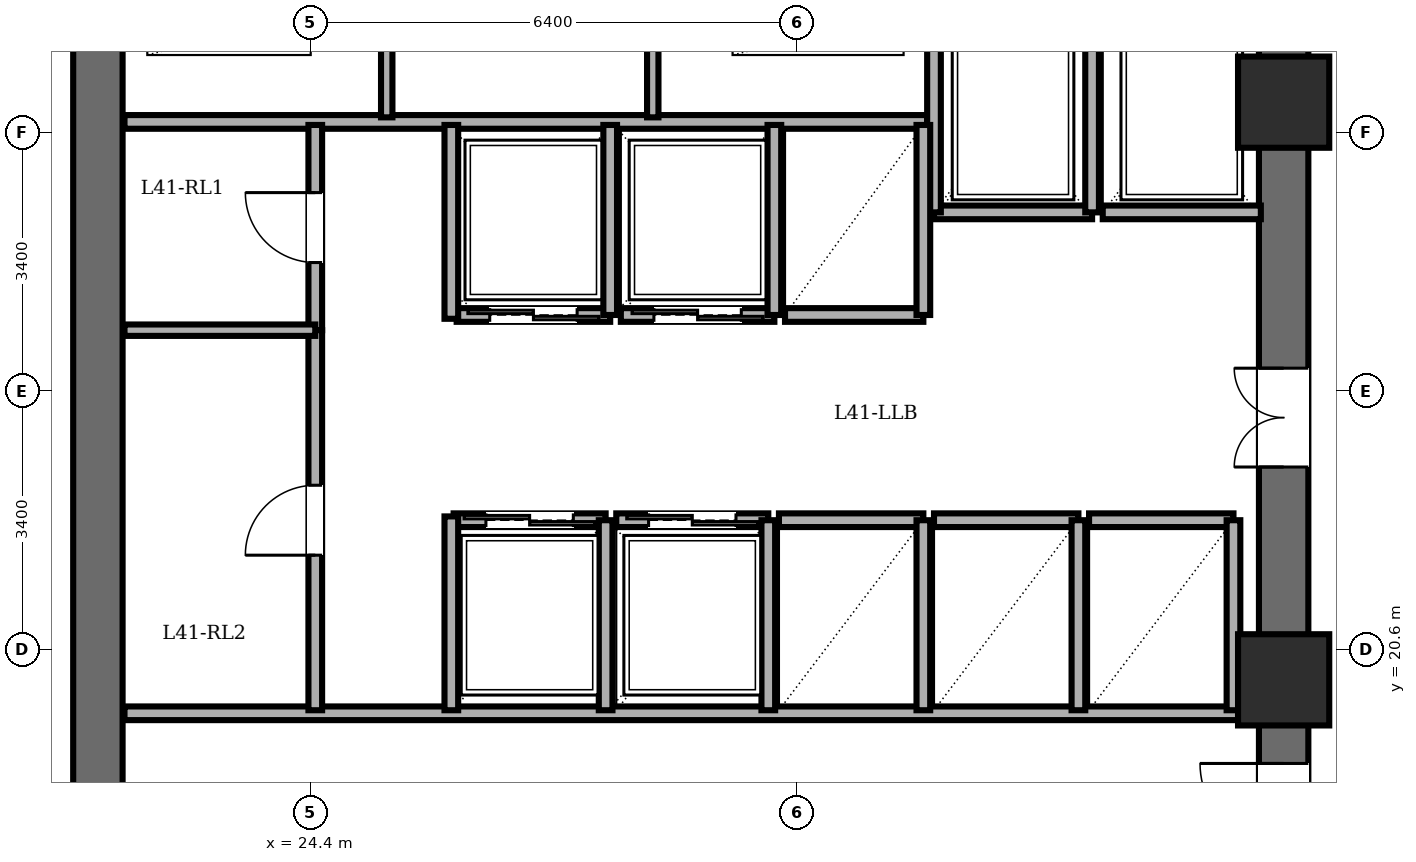
"""IFC4 building model, lengths in metres.
Left out: names, types, materials, properties, quantities, classifications, styles, units other than length and angle.
Written with IfcOpenShell. Run it as: python <this file> out.ifc"""

import sys

from ifc_helpers import new_model, si_unit, direction, frame, frame_2d, origin, origin_2d, place, context, subcontext, project, spatial, rectangle, extrude, element, fill, save


model = new_model("IFC4")
c1 = context("Model", 3, precision=1e-05, world=origin(), true_north=direction((0.0, 1.0)))
c2 = subcontext(c1, "Body", "Model", "MODEL_VIEW")
j1 = project(units=[si_unit("LENGTHUNIT", "METRE"), si_unit("PLANEANGLEUNIT", "RADIAN")], contexts=[c1])
p1 = place(None, origin())
s1 = spatial("IfcSite", under=j1, at=p1, CompositionType="ELEMENT")
p2 = place(p1, origin())
s2 = spatial("IfcBuilding", under=s1, at=p2, CompositionType="ELEMENT")
p3 = place(p2, frame((0.0, 0.0, 158.2)))
s3 = spatial("IfcBuildingStorey", under=s2, at=p3, CompositionType="ELEMENT", Elevation=158.2)
for number, where, z_axis, x_axis in (
    (1, (37.2, 20.2, 0.0), (0.0, 0.0, 1.0), (1.0, 0.0, 0.0)),
    (2, (37.2, 27.8, 0.0), (0.0, 0.0, 1.0), (1.0, 0.0, 0.0)),
):
    element("IfcColumn", number, at=place(p3, frame(where, z_axis=z_axis, x_axis=x_axis)), inside=s3, PredefinedType="COLUMN", context=c2, shape_type="SweptSolid", body=[
        extrude(rectangle(XDim=1.2, YDim=1.2, at=origin_2d()), origin(), (0.0, 0.0, 1.0), 3.6),
    ])
p4 = place(p3, frame((21.6, 14.4, 0.0), z_axis=(0.0, 0.0, 1.0), x_axis=(0.0, 1.0, 0.0)))
e3 = element("IfcWall", 3, at=p4, inside=s3, PredefinedType="SHEAR", context=c2, shape_type="SweptSolid", body=[
    extrude(rectangle(XDim=19.2, YDim=0.65, at=frame_2d((9.6, 0.0))), origin(), (0.0, 0.0, 1.0), 3.4),
])
p5 = place(p3, frame((37.2, 14.4, 0.0), z_axis=(0.0, 0.0, 1.0), x_axis=(0.0, 1.0, 0.0)))
e4 = element("IfcWall", 4, at=p5, inside=s3, PredefinedType="SHEAR", context=c2, shape_type="SweptSolid", body=[
    extrude(rectangle(XDim=19.2, YDim=0.65, at=frame_2d((9.6, 0.0))), origin(), (0.0, 0.0, 1.0), 3.4),
])
p6 = place(p5, frame((15.8, 0.0, 0.0)))
e5 = element("IfcOpeningElement", 5, at=p6, cuts=e4, PredefinedType="OPENING", context=c2, shape_type="SweptSolid", body=[
    extrude(rectangle(XDim=1.15, YDim=2.15, at=frame_2d((0.575, 1.075))), frame((0.0, 0.335, 0.0), z_axis=(0.0, -1.0, 0.0), x_axis=(1.0, 0.0, 0.0)), (0.0, 0.0, 1.0), 0.67),
])
p7 = place(p5, frame((3.6, 0.0, 0.0)))
e6 = element("IfcOpeningElement", 6, at=p7, cuts=e4, PredefinedType="OPENING", context=c2, shape_type="SweptSolid", body=[
    extrude(rectangle(XDim=1.1, YDim=2.15, at=frame_2d((0.55, 1.075))), frame((0.0, 0.335, 0.0), z_axis=(0.0, -1.0, 0.0), x_axis=(1.0, 0.0, 0.0)), (0.0, 0.0, 1.0), 0.67),
])
p8 = place(p5, frame((8.6, 0.0, 0.0)))
e7 = element("IfcOpeningElement", 7, at=p8, cuts=e4, PredefinedType="OPENING", context=c2, shape_type="SweptSolid", body=[
    extrude(rectangle(XDim=1.3, YDim=2.2, at=frame_2d((0.65, 1.1))), frame((0.0, 0.335, 0.0), z_axis=(0.0, -1.0, 0.0), x_axis=(1.0, 0.0, 0.0)), (0.0, 0.0, 1.0), 0.67),
])
p9 = place(p3, frame((21.95, 27.54, 0.0), z_axis=(0.0, 0.0, 1.0), x_axis=(1.0, 0.0, 0.0)))
e8 = element("IfcWall", 8, at=p9, inside=s3, PredefinedType="PARTITIONING", context=c2, shape_type="SweptSolid", body=[
    extrude(rectangle(XDim=10.56, YDim=0.18, at=frame_2d((5.28, 0.0))), origin(), (0.0, 0.0, 1.0), 3.4),
])
for number, where, z_axis, x_axis in (
    (9, (25.4, 27.6, 0.0), (0.0, 0.0, 1.0), (0.0, 1.0, 0.0)),
    (10, (28.9, 27.6, 0.0), (0.0, 0.0, 1.0), (0.0, 1.0, 0.0)),
):
    element("IfcWall", number, at=place(p3, frame(where, z_axis=z_axis, x_axis=x_axis)), inside=s3, PredefinedType="PARTITIONING", context=c2, shape_type="SweptSolid", body=[
        extrude(rectangle(XDim=1.52, YDim=0.15, at=frame_2d((0.76, 0.0))), origin(), (0.0, 0.0, 1.0), 3.4),
    ])
p10 = place(p3, frame((21.95, 19.76, 0.0), z_axis=(0.0, 0.0, 1.0), x_axis=(1.0, 0.0, 0.0)))
e11 = element("IfcWall", 11, at=p10, inside=s3, PredefinedType="PARTITIONING", context=c2, shape_type="SweptSolid", body=[
    extrude(rectangle(XDim=14.87, YDim=0.18, at=frame_2d((7.435, 0.0))), origin(), (0.0, 0.0, 1.0), 3.4),
])
p11 = place(p3, frame((34.68, 26.35, 0.0), z_axis=(0.0, 0.0, 1.0), x_axis=(-1.0, 0.0, 0.0)))
e12 = element("IfcWall", 12, at=p11, inside=s3, PredefinedType="PARTITIONING", context=c2, shape_type="SweptSolid", body=[
    extrude(rectangle(XDim=2.08, YDim=0.18, at=frame_2d((1.04, 0.0))), origin(), (0.0, 0.0, 1.0), 3.4),
])
for number, where, z_axis, x_axis in (
    (13, (34.68, 26.35, 0.0), (0.0, 0.0, 1.0), (0.0, 1.0, 0.0)),
    (14, (32.6, 29.08, 0.0), (0.0, 0.0, 1.0), (0.0, -1.0, 0.0)),
):
    element("IfcWall", number, at=place(p3, frame(where, z_axis=z_axis, x_axis=x_axis)), inside=s3, PredefinedType="PARTITIONING", context=c2, shape_type="SweptSolid", body=[
        extrude(rectangle(XDim=2.73, YDim=0.18, at=frame_2d((1.365, 0.0))), origin(), (0.0, 0.0, 1.0), 3.4),
    ])
p12 = place(p3, frame((36.9, 26.35, 0.0), z_axis=(0.0, 0.0, 1.0), x_axis=(-1.0, 0.0, 0.0)))
e15 = element("IfcWall", 15, at=p12, inside=s3, PredefinedType="PARTITIONING", context=c2, shape_type="SweptSolid", body=[
    extrude(rectangle(XDim=2.08, YDim=0.18, at=frame_2d((1.04, 0.0))), origin(), (0.0, 0.0, 1.0), 3.4),
])
p13 = place(p3, frame((28.34, 25.0, 0.0), z_axis=(0.0, 0.0, 1.0), x_axis=(-1.0, 0.0, 0.0)))
e16 = element("IfcWall", 16, at=p13, inside=s3, PredefinedType="PARTITIONING", context=c2, shape_type="SweptSolid", body=[
    extrude(rectangle(XDim=2.02, YDim=0.18, at=frame_2d((1.01, 0.0))), origin(), (0.0, 0.0, 1.0), 3.4),
])
p14 = place(p13, frame((0.435, 0.0, 0.0)))
e17 = element("IfcOpeningElement", 17, at=p14, cuts=e16, PredefinedType="OPENING", context=c2, shape_type="SweptSolid", body=[
    extrude(rectangle(XDim=1.15, YDim=2.2, at=frame_2d((0.575, 1.1))), frame((0.0, 0.1, 0.0), z_axis=(0.0, -1.0, 0.0), x_axis=(1.0, 0.0, 0.0)), (0.0, 0.0, 1.0), 0.2),
])
p15 = place(p3, frame((28.34, 25.0, 0.0), z_axis=(0.0, 0.0, 1.0), x_axis=(0.0, 1.0, 0.0)))
e18 = element("IfcWall", 18, at=p15, inside=s3, PredefinedType="PARTITIONING", context=c2, shape_type="SweptSolid", body=[
    extrude(rectangle(XDim=2.5, YDim=0.18, at=frame_2d((1.25, 0.0))), origin(), (0.0, 0.0, 1.0), 3.4),
])
p16 = place(p3, frame((30.5, 25.0, 0.0), z_axis=(0.0, 0.0, 1.0), x_axis=(-1.0, 0.0, 0.0)))
e19 = element("IfcWall", 19, at=p16, inside=s3, PredefinedType="PARTITIONING", context=c2, shape_type="SweptSolid", body=[
    extrude(rectangle(XDim=2.02, YDim=0.18, at=frame_2d((1.01, 0.0))), origin(), (0.0, 0.0, 1.0), 3.4),
])
p17 = place(p16, frame((0.435, 0.0, 0.0)))
e20 = element("IfcOpeningElement", 20, at=p17, cuts=e19, PredefinedType="OPENING", context=c2, shape_type="SweptSolid", body=[
    extrude(rectangle(XDim=1.15, YDim=2.2, at=frame_2d((0.575, 1.1))), frame((0.0, 0.1, 0.0), z_axis=(0.0, -1.0, 0.0), x_axis=(1.0, 0.0, 0.0)), (0.0, 0.0, 1.0), 0.2),
])
p18 = place(p3, frame((30.5, 25.0, 0.0), z_axis=(0.0, 0.0, 1.0), x_axis=(0.0, 1.0, 0.0)))
e21 = element("IfcWall", 21, at=p18, inside=s3, PredefinedType="PARTITIONING", context=c2, shape_type="SweptSolid", body=[
    extrude(rectangle(XDim=2.5, YDim=0.18, at=frame_2d((1.25, 0.0))), origin(), (0.0, 0.0, 1.0), 3.4),
])
p19 = place(p3, frame((26.28, 22.3, 0.0), z_axis=(0.0, 0.0, 1.0), x_axis=(1.0, 0.0, 0.0)))
e22 = element("IfcWall", 22, at=p19, inside=s3, PredefinedType="PARTITIONING", context=c2, shape_type="SweptSolid", body=[
    extrude(rectangle(XDim=2.0, YDim=0.18, at=frame_2d((1.0, 0.0))), origin(), (0.0, 0.0, 1.0), 3.4),
])
p20 = place(p19, frame((0.425, 0.0, 0.0)))
e23 = element("IfcOpeningElement", 23, at=p20, cuts=e22, PredefinedType="OPENING", context=c2, shape_type="SweptSolid", body=[
    extrude(rectangle(XDim=1.15, YDim=2.2, at=frame_2d((0.575, 1.1))), frame((0.0, 0.1, 0.0), z_axis=(0.0, -1.0, 0.0), x_axis=(1.0, 0.0, 0.0)), (0.0, 0.0, 1.0), 0.2),
])
p21 = place(p3, frame((28.28, 19.8, 0.0), z_axis=(0.0, 0.0, 1.0), x_axis=(0.0, 1.0, 0.0)))
e24 = element("IfcWall", 24, at=p21, inside=s3, PredefinedType="PARTITIONING", context=c2, shape_type="SweptSolid", body=[
    extrude(rectangle(XDim=2.5, YDim=0.18, at=frame_2d((1.25, 0.0))), origin(), (0.0, 0.0, 1.0), 3.4),
])
p22 = place(p3, frame((28.42, 22.3, 0.0), z_axis=(0.0, 0.0, 1.0), x_axis=(1.0, 0.0, 0.0)))
e25 = element("IfcWall", 25, at=p22, inside=s3, PredefinedType="PARTITIONING", context=c2, shape_type="SweptSolid", body=[
    extrude(rectangle(XDim=2.0, YDim=0.18, at=frame_2d((1.0, 0.0))), origin(), (0.0, 0.0, 1.0), 3.4),
])
p23 = place(p22, frame((0.425, 0.0, 0.0)))
e26 = element("IfcOpeningElement", 26, at=p23, cuts=e25, PredefinedType="OPENING", context=c2, shape_type="SweptSolid", body=[
    extrude(rectangle(XDim=1.15, YDim=2.2, at=frame_2d((0.575, 1.1))), frame((0.0, 0.1, 0.0), z_axis=(0.0, -1.0, 0.0), x_axis=(1.0, 0.0, 0.0)), (0.0, 0.0, 1.0), 0.2),
])
p24 = place(p3, frame((30.42, 19.8, 0.0), z_axis=(0.0, 0.0, 1.0), x_axis=(0.0, 1.0, 0.0)))
e27 = element("IfcWall", 27, at=p24, inside=s3, PredefinedType="PARTITIONING", context=c2, shape_type="SweptSolid", body=[
    extrude(rectangle(XDim=2.5, YDim=0.18, at=frame_2d((1.25, 0.0))), origin(), (0.0, 0.0, 1.0), 3.4),
])
p25 = place(p3, frame((32.46, 25.0, 0.0), z_axis=(0.0, 0.0, 1.0), x_axis=(-1.0, 0.0, 0.0)))
e28 = element("IfcWall", 28, at=p25, inside=s3, PredefinedType="PARTITIONING", context=c2, shape_type="SweptSolid", body=[
    extrude(rectangle(XDim=1.82, YDim=0.18, at=frame_2d((0.91, 0.0))), origin(), (0.0, 0.0, 1.0), 3.4),
])
p26 = place(p3, frame((32.46, 25.0, 0.0), z_axis=(0.0, 0.0, 1.0), x_axis=(0.0, 1.0, 0.0)))
e29 = element("IfcWall", 29, at=p26, inside=s3, PredefinedType="PARTITIONING", context=c2, shape_type="SweptSolid", body=[
    extrude(rectangle(XDim=2.5, YDim=0.18, at=frame_2d((1.25, 0.0))), origin(), (0.0, 0.0, 1.0), 3.4),
])
p27 = place(p3, frame((30.56, 22.3, 0.0), z_axis=(0.0, 0.0, 1.0), x_axis=(1.0, 0.0, 0.0)))
e30 = element("IfcWall", 30, at=p27, inside=s3, PredefinedType="PARTITIONING", context=c2, shape_type="SweptSolid", body=[
    extrude(rectangle(XDim=1.9, YDim=0.18, at=frame_2d((0.95, 0.0))), origin(), (0.0, 0.0, 1.0), 3.4),
])
p28 = place(p3, frame((32.46, 19.8, 0.0), z_axis=(0.0, 0.0, 1.0), x_axis=(0.0, 1.0, 0.0)))
e31 = element("IfcWall", 31, at=p28, inside=s3, PredefinedType="PARTITIONING", context=c2, shape_type="SweptSolid", body=[
    extrude(rectangle(XDim=2.5, YDim=0.18, at=frame_2d((1.25, 0.0))), origin(), (0.0, 0.0, 1.0), 3.4),
])
p29 = place(p3, frame((32.6, 22.3, 0.0), z_axis=(0.0, 0.0, 1.0), x_axis=(1.0, 0.0, 0.0)))
e32 = element("IfcWall", 32, at=p29, inside=s3, PredefinedType="PARTITIONING", context=c2, shape_type="SweptSolid", body=[
    extrude(rectangle(XDim=1.9, YDim=0.18, at=frame_2d((0.95, 0.0))), origin(), (0.0, 0.0, 1.0), 3.4),
])
p30 = place(p3, frame((34.5, 19.8, 0.0), z_axis=(0.0, 0.0, 1.0), x_axis=(0.0, 1.0, 0.0)))
e33 = element("IfcWall", 33, at=p30, inside=s3, PredefinedType="PARTITIONING", context=c2, shape_type="SweptSolid", body=[
    extrude(rectangle(XDim=2.5, YDim=0.18, at=frame_2d((1.25, 0.0))), origin(), (0.0, 0.0, 1.0), 3.4),
])
p31 = place(p3, frame((34.64, 22.3, 0.0), z_axis=(0.0, 0.0, 1.0), x_axis=(1.0, 0.0, 0.0)))
e34 = element("IfcWall", 34, at=p31, inside=s3, PredefinedType="PARTITIONING", context=c2, shape_type="SweptSolid", body=[
    extrude(rectangle(XDim=1.9, YDim=0.18, at=frame_2d((0.95, 0.0))), origin(), (0.0, 0.0, 1.0), 3.4),
])
p32 = place(p3, frame((36.54, 19.8, 0.0), z_axis=(0.0, 0.0, 1.0), x_axis=(0.0, 1.0, 0.0)))
e35 = element("IfcWall", 35, at=p32, inside=s3, PredefinedType="PARTITIONING", context=c2, shape_type="SweptSolid", body=[
    extrude(rectangle(XDim=2.5, YDim=0.18, at=frame_2d((1.25, 0.0))), origin(), (0.0, 0.0, 1.0), 3.4),
])
p33 = place(p3, frame((24.46, 24.8, 0.0), z_axis=(0.0, 0.0, 1.0), x_axis=(0.0, 1.0, 0.0)))
e36 = element("IfcWall", 36, at=p33, inside=s3, PredefinedType="PARTITIONING", context=c2, shape_type="SweptSolid", body=[
    extrude(rectangle(XDim=2.7, YDim=0.18, at=frame_2d((1.35, 0.0))), origin(), (0.0, 0.0, 1.0), 3.4),
])
p34 = place(p33, frame((0.89, 0.0, 0.0)))
e37 = element("IfcOpeningElement", 37, at=p34, cuts=e36, PredefinedType="OPENING", context=c2, shape_type="SweptSolid", body=[
    extrude(rectangle(XDim=0.92, YDim=2.1, at=frame_2d((0.46, 1.05))), frame((0.0, 0.1, 0.0), z_axis=(0.0, -1.0, 0.0), x_axis=(1.0, 0.0, 0.0)), (0.0, 0.0, 1.0), 0.2),
])
p35 = place(p3, frame((24.46, 19.8, 0.0), z_axis=(0.0, 0.0, 1.0), x_axis=(0.0, 1.0, 0.0)))
e38 = element("IfcWall", 38, at=p35, inside=s3, PredefinedType="PARTITIONING", context=c2, shape_type="SweptSolid", body=[
    extrude(rectangle(XDim=5.0, YDim=0.18, at=frame_2d((2.5, 0.0))), origin(), (0.0, 0.0, 1.0), 3.4),
])
p36 = place(p35, frame((2.04, 0.0, 0.0)))
e39 = element("IfcOpeningElement", 39, at=p36, cuts=e38, PredefinedType="OPENING", context=c2, shape_type="SweptSolid", body=[
    extrude(rectangle(XDim=0.92, YDim=2.1, at=frame_2d((0.46, 1.05))), frame((0.0, 0.1, 0.0), z_axis=(0.0, -1.0, 0.0), x_axis=(1.0, 0.0, 0.0)), (0.0, 0.0, 1.0), 0.2),
])
p37 = place(p3, frame((21.95, 24.8, 0.0), z_axis=(0.0, 0.0, 1.0), x_axis=(1.0, 0.0, 0.0)))
e40 = element("IfcWall", 40, at=p37, inside=s3, PredefinedType="PARTITIONING", context=c2, shape_type="SweptSolid", body=[
    extrude(rectangle(XDim=2.51, YDim=0.15, at=frame_2d((1.255, 0.0))), origin(), (0.0, 0.0, 1.0), 3.4),
])
for number, where, z_axis, x_axis in (
    (41, (26.25, 24.95, 0.0), (0.0, 0.0, 1.0), (0.0, 1.0, 0.0)),
    (42, (26.25, 19.8, 0.0), (0.0, 0.0, 1.0), (0.0, 1.0, 0.0)),
):
    element("IfcWall", number, at=place(p3, frame(where, z_axis=z_axis, x_axis=x_axis)), inside=s3, PredefinedType="PARTITIONING", context=c2, shape_type="SweptSolid", body=[
        extrude(rectangle(XDim=2.55, YDim=0.18, at=frame_2d((1.275, 0.0))), origin(), (0.0, 0.0, 1.0), 3.4),
    ])
p38 = place(p7, origin())
e43 = element("IfcDoor", 43, at=p38, inside=s3, OperationType="SINGLE_SWING_RIGHT", PredefinedType="DOOR", context=c2, shape_type="SweptSolid", body=[
    extrude(rectangle(XDim=1.1, YDim=2.15, at=frame_2d((0.55, 1.075))), frame((0.0, 0.025, 0.0), z_axis=(0.0, -1.0, 0.0), x_axis=(1.0, 0.0, 0.0)), (0.0, 0.0, 1.0), 0.05),
])
fill(e6, e43)
p39 = place(p14, origin())
e44 = element("IfcDoor", 44, at=p39, inside=s3, OperationType="DOUBLE_DOOR_SLIDING", PredefinedType="DOOR", context=c2, shape_type="SweptSolid", body=[
    extrude(rectangle(XDim=1.15, YDim=2.2, at=frame_2d((0.575, 1.1))), frame((0.0, 0.025, 0.0), z_axis=(0.0, -1.0, 0.0), x_axis=(1.0, 0.0, 0.0)), (0.0, 0.0, 1.0), 0.05),
])
fill(e17, e44)
p40 = place(p17, origin())
e45 = element("IfcDoor", 45, at=p40, inside=s3, OperationType="DOUBLE_DOOR_SLIDING", PredefinedType="DOOR", context=c2, shape_type="SweptSolid", body=[
    extrude(rectangle(XDim=1.15, YDim=2.2, at=frame_2d((0.575, 1.1))), frame((0.0, 0.025, 0.0), z_axis=(0.0, -1.0, 0.0), x_axis=(1.0, 0.0, 0.0)), (0.0, 0.0, 1.0), 0.05),
])
fill(e20, e45)
p41 = place(p20, origin())
e46 = element("IfcDoor", 46, at=p41, inside=s3, OperationType="DOUBLE_DOOR_SLIDING", PredefinedType="DOOR", context=c2, shape_type="SweptSolid", body=[
    extrude(rectangle(XDim=1.15, YDim=2.2, at=frame_2d((0.575, 1.1))), frame((0.0, 0.025, 0.0), z_axis=(0.0, -1.0, 0.0), x_axis=(1.0, 0.0, 0.0)), (0.0, 0.0, 1.0), 0.05),
])
fill(e23, e46)
p42 = place(p23, origin())
e47 = element("IfcDoor", 47, at=p42, inside=s3, OperationType="DOUBLE_DOOR_SLIDING", PredefinedType="DOOR", context=c2, shape_type="SweptSolid", body=[
    extrude(rectangle(XDim=1.15, YDim=2.2, at=frame_2d((0.575, 1.1))), frame((0.0, 0.025, 0.0), z_axis=(0.0, -1.0, 0.0), x_axis=(1.0, 0.0, 0.0)), (0.0, 0.0, 1.0), 0.05),
])
fill(e26, e47)
p43 = place(p34, origin())
e48 = element("IfcDoor", 48, at=p43, inside=s3, OperationType="SINGLE_SWING_RIGHT", PredefinedType="DOOR", context=c2, shape_type="SweptSolid", body=[
    extrude(rectangle(XDim=0.92, YDim=2.1, at=frame_2d((0.46, 1.05))), frame((0.0, 0.025, 0.0), z_axis=(0.0, -1.0, 0.0), x_axis=(1.0, 0.0, 0.0)), (0.0, 0.0, 1.0), 0.05),
])
fill(e37, e48)
p44 = place(p36, origin())
e49 = element("IfcDoor", 49, at=p44, inside=s3, OperationType="SINGLE_SWING_LEFT", PredefinedType="DOOR", context=c2, shape_type="SweptSolid", body=[
    extrude(rectangle(XDim=0.92, YDim=2.1, at=frame_2d((0.46, 1.05))), frame((0.0, 0.025, 0.0), z_axis=(0.0, -1.0, 0.0), x_axis=(1.0, 0.0, 0.0)), (0.0, 0.0, 1.0), 0.05),
])
fill(e39, e49)
p45 = place(p8, origin())
e50 = element("IfcDoor", 50, at=p45, inside=s3, OperationType="DOUBLE_DOOR_SINGLE_SWING", PredefinedType="DOOR", context=c2, shape_type="SweptSolid", body=[
    extrude(rectangle(XDim=1.3, YDim=2.2, at=frame_2d((0.65, 1.1))), frame((0.0, 0.025, 0.0), z_axis=(0.0, -1.0, 0.0), x_axis=(1.0, 0.0, 0.0)), (0.0, 0.0, 1.0), 0.05),
])
fill(e7, e50)
save(model, sys.argv[1])
